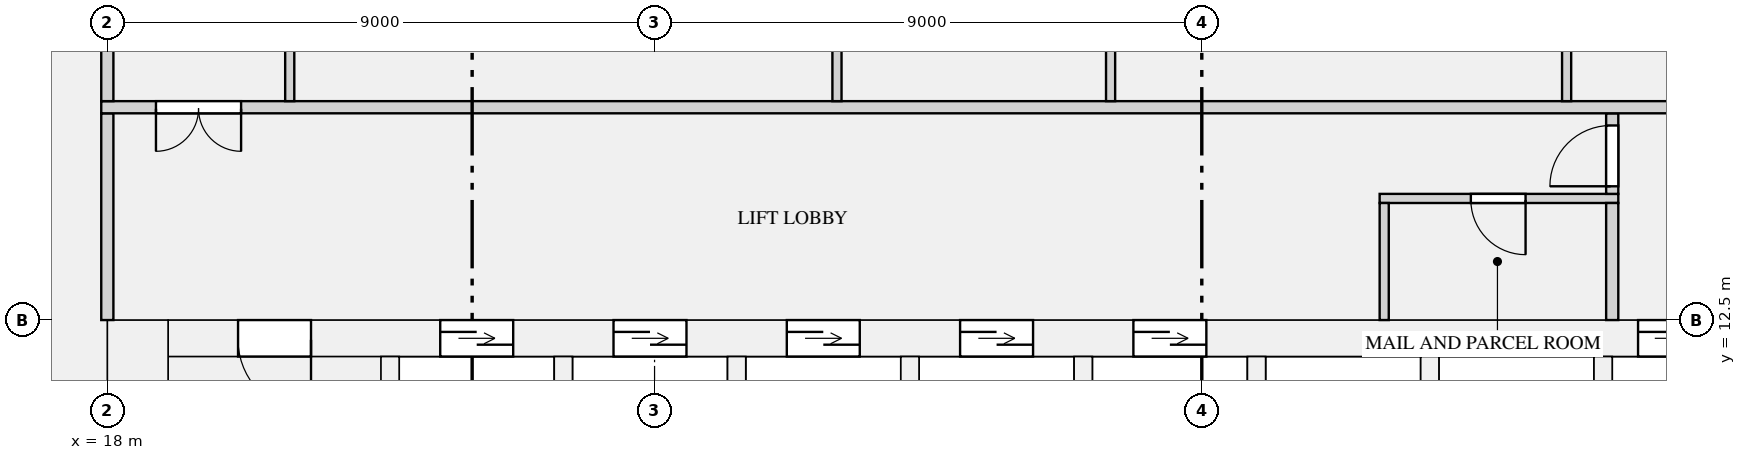
"""IFC4 building model, lengths in metres.
Left out: names, types, materials, properties, quantities, classifications, styles, units other than length and angle.
Written with IfcOpenShell. Run it as: python <this file> out.ifc"""

import sys

from ifc_helpers import new_model, si_unit, direction, frame, frame_2d, origin, place, context, subcontext, project, spatial, rectangle, extrude, element, fill, save


model = new_model("IFC4")
c1 = context("Model", 3, precision=1e-05, world=origin(), true_north=direction((0.0, 1.0)))
c2 = subcontext(c1, "Body", "Model", "MODEL_VIEW")
j1 = project(units=[si_unit("LENGTHUNIT", "METRE"), si_unit("PLANEANGLEUNIT", "RADIAN")], contexts=[c1])
p1 = place(None, origin())
s1 = spatial("IfcSite", under=j1, at=p1, CompositionType="ELEMENT")
p2 = place(p1, origin())
s2 = spatial("IfcBuilding", under=s1, at=p2, CompositionType="ELEMENT")
p3 = place(p2, frame((0.0, 0.0, 69.9)))
s3 = spatial("IfcBuildingStorey", under=s2, at=p3, CompositionType="ELEMENT", Elevation=69.9)
p4 = place(p3, frame((18.5, 0.0, 0.0), z_axis=(0.0, 0.0, 1.0), x_axis=(0.0, 1.0, 0.0)))
e1 = element("IfcWall", 1, at=p4, inside=s3, PredefinedType="SHEAR", context=c2, shape_type="SweptSolid", body=[
    extrude(rectangle(XDim=12.5, YDim=1.0, at=frame_2d((6.25, 0.0))), origin(), (0.0, 0.0, 1.0), 3.15),
])
p5 = place(p3, frame((19.0, 12.2, 0.0), z_axis=(0.0, 0.0, 1.0), x_axis=(1.0, 0.0, 0.0)))
e2 = element("IfcWall", 2, at=p5, inside=s3, PredefinedType="SHEAR", context=c2, shape_type="SweptSolid", body=[
    extrude(rectangle(XDim=34.0, YDim=0.6, at=frame_2d((17.0, 0.0))), origin(), (0.0, 0.0, 1.0), 3.15),
])
p6 = place(p5, frame((4.475, 0.0, 0.0)))
e3 = element("IfcOpeningElement", 3, at=p6, cuts=e2, PredefinedType="OPENING", context=c2, shape_type="SweptSolid", body=[
    extrude(rectangle(XDim=1.2, YDim=2.1, at=frame_2d((0.6, 1.05))), frame((0.0, 0.31, 0.0), z_axis=(0.0, -1.0, 0.0), x_axis=(1.0, 0.0, 0.0)), (0.0, 0.0, 1.0), 0.62),
])
p7 = place(p5, frame((7.325, 0.0, 0.0)))
e4 = element("IfcOpeningElement", 4, at=p7, cuts=e2, PredefinedType="OPENING", context=c2, shape_type="SweptSolid", body=[
    extrude(rectangle(XDim=1.2, YDim=2.1, at=frame_2d((0.6, 1.05))), frame((0.0, 0.31, 0.0), z_axis=(0.0, -1.0, 0.0), x_axis=(1.0, 0.0, 0.0)), (0.0, 0.0, 1.0), 0.62),
])
p8 = place(p5, frame((10.175, 0.0, 0.0)))
e5 = element("IfcOpeningElement", 5, at=p8, cuts=e2, PredefinedType="OPENING", context=c2, shape_type="SweptSolid", body=[
    extrude(rectangle(XDim=1.2, YDim=2.1, at=frame_2d((0.6, 1.05))), frame((0.0, 0.31, 0.0), z_axis=(0.0, -1.0, 0.0), x_axis=(1.0, 0.0, 0.0)), (0.0, 0.0, 1.0), 0.62),
])
p9 = place(p5, frame((13.025, 0.0, 0.0)))
e6 = element("IfcOpeningElement", 6, at=p9, cuts=e2, PredefinedType="OPENING", context=c2, shape_type="SweptSolid", body=[
    extrude(rectangle(XDim=1.2, YDim=2.1, at=frame_2d((0.6, 1.05))), frame((0.0, 0.31, 0.0), z_axis=(0.0, -1.0, 0.0), x_axis=(1.0, 0.0, 0.0)), (0.0, 0.0, 1.0), 0.62),
])
p10 = place(p5, frame((15.875, 0.0, 0.0)))
e7 = element("IfcOpeningElement", 7, at=p10, cuts=e2, PredefinedType="OPENING", context=c2, shape_type="SweptSolid", body=[
    extrude(rectangle(XDim=1.2, YDim=2.1, at=frame_2d((0.6, 1.05))), frame((0.0, 0.31, 0.0), z_axis=(0.0, -1.0, 0.0), x_axis=(1.0, 0.0, 0.0)), (0.0, 0.0, 1.0), 0.62),
])
p11 = place(p5, frame((24.175, 0.0, 0.0)))
e8 = element("IfcOpeningElement", 8, at=p11, cuts=e2, PredefinedType="OPENING", context=c2, shape_type="SweptSolid", body=[
    extrude(rectangle(XDim=1.1, YDim=2.1, at=frame_2d((0.55, 1.05))), frame((0.0, 0.31, 0.0), z_axis=(0.0, -1.0, 0.0), x_axis=(1.0, 0.0, 0.0)), (0.0, 0.0, 1.0), 0.62),
])
p12 = place(p5, frame((26.425, 0.0, 0.0)))
e9 = element("IfcOpeningElement", 9, at=p12, cuts=e2, PredefinedType="OPENING", context=c2, shape_type="SweptSolid", body=[
    extrude(rectangle(XDim=1.1, YDim=2.1, at=frame_2d((0.55, 1.05))), frame((0.0, 0.31, 0.0), z_axis=(0.0, -1.0, 0.0), x_axis=(1.0, 0.0, 0.0)), (0.0, 0.0, 1.0), 0.62),
])
p13 = place(p5, frame((28.675, 0.0, 0.0)))
e10 = element("IfcOpeningElement", 10, at=p13, cuts=e2, PredefinedType="OPENING", context=c2, shape_type="SweptSolid", body=[
    extrude(rectangle(XDim=1.1, YDim=2.1, at=frame_2d((0.55, 1.05))), frame((0.0, 0.31, 0.0), z_axis=(0.0, -1.0, 0.0), x_axis=(1.0, 0.0, 0.0)), (0.0, 0.0, 1.0), 0.62),
])
p14 = place(p5, frame((1.15, 0.0, 0.0)))
e11 = element("IfcOpeningElement", 11, at=p14, cuts=e2, PredefinedType="OPENING", context=c2, shape_type="SweptSolid", body=[
    extrude(rectangle(XDim=1.2, YDim=2.1, at=frame_2d((0.6, 1.05))), frame((0.0, 0.31, 0.0), z_axis=(0.0, -1.0, 0.0), x_axis=(1.0, 0.0, 0.0)), (0.0, 0.0, 1.0), 0.62),
])
p15 = place(p5, frame((31.65, 0.0, 0.0)))
e12 = element("IfcOpeningElement", 12, at=p15, cuts=e2, PredefinedType="OPENING", context=c2, shape_type="SweptSolid", body=[
    extrude(rectangle(XDim=1.2, YDim=2.1, at=frame_2d((0.6, 1.05))), frame((0.0, 0.31, 0.0), z_axis=(0.0, -1.0, 0.0), x_axis=(1.0, 0.0, 0.0)), (0.0, 0.0, 1.0), 0.62),
])
for number, where, z_axis, x_axis in (
    (13, (22.65, 9.35, 0.0), (0.0, 0.0, 1.0), (0.0, 1.0, 0.0)),
    (14, (25.5, 9.35, 0.0), (0.0, 0.0, 1.0), (0.0, 1.0, 0.0)),
    (15, (28.35, 9.35, 0.0), (0.0, 0.0, 1.0), (0.0, 1.0, 0.0)),
    (16, (31.2, 9.35, 0.0), (0.0, 0.0, 1.0), (0.0, 1.0, 0.0)),
    (17, (34.05, 9.35, 0.0), (0.0, 0.0, 1.0), (0.0, 1.0, 0.0)),
    (18, (36.9, 9.35, 0.0), (0.0, 0.0, 1.0), (0.0, 1.0, 0.0)),
    (19, (39.75, 9.35, 0.0), (0.0, 0.0, 1.0), (0.0, 1.0, 0.0)),
):
    element("IfcWall", number, at=place(p3, frame(where, z_axis=z_axis, x_axis=x_axis)), inside=s3, PredefinedType="SHEAR", context=c2, shape_type="SweptSolid", body=[
        extrude(rectangle(XDim=2.55, YDim=0.3, at=frame_2d((1.275, 0.0))), origin(), (0.0, 0.0, 1.0), 3.15),
    ])
p16 = place(p3, frame((42.6, 8.25, 0.0), z_axis=(0.0, 0.0, 1.0), x_axis=(0.0, 1.0, 0.0)))
e20 = element("IfcWall", 20, at=p16, inside=s3, PredefinedType="SHEAR", context=c2, shape_type="SweptSolid", body=[
    extrude(rectangle(XDim=3.65, YDim=0.3, at=frame_2d((1.825, 0.0))), origin(), (0.0, 0.0, 1.0), 3.15),
])
p17 = place(p3, frame((38.925, 14.5, 0.0), z_axis=(0.0, 0.0, 1.0), x_axis=(1.0, 0.0, 0.0)))
e21 = element("IfcWall", 21, at=p17, inside=s3, PredefinedType="PARTITIONING", context=c2, shape_type="SweptSolid", body=[
    extrude(rectangle(XDim=3.925, YDim=0.15, at=frame_2d((1.962, 0.0))), origin(), (0.0, 0.0, 1.0), 2.65),
])
p18 = place(p17, frame((1.5, 0.0, 0.0)))
e22 = element("IfcOpeningElement", 22, at=p18, cuts=e21, PredefinedType="OPENING", context=c2, shape_type="SweptSolid", body=[
    extrude(rectangle(XDim=0.9, YDim=2.1, at=frame_2d((0.45, 1.05))), frame((0.0, 0.085, 0.0), z_axis=(0.0, -1.0, 0.0), x_axis=(1.0, 0.0, 0.0)), (0.0, 0.0, 1.0), 0.17),
])
p19 = place(p3, frame((18.0, 12.5, 0.0), z_axis=(0.0, 0.0, 1.0), x_axis=(0.0, 1.0, 0.0)))
e23 = element("IfcWall", 23, at=p19, inside=s3, PredefinedType="PARTITIONING", context=c2, shape_type="SweptSolid", body=[
    extrude(rectangle(XDim=3.4, YDim=0.2, at=frame_2d((1.7, 0.0))), origin(), (0.0, 0.0, 1.0), 2.65),
])
p20 = place(p3, frame((39.0, 12.5, 0.0), z_axis=(0.0, 0.0, 1.0), x_axis=(0.0, 1.0, 0.0)))
e24 = element("IfcWall", 24, at=p20, inside=s3, PredefinedType="PARTITIONING", context=c2, shape_type="SweptSolid", body=[
    extrude(rectangle(XDim=1.925, YDim=0.15, at=frame_2d((0.962, 0.0))), origin(), (0.0, 0.0, 1.0), 2.65),
])
p21 = place(p3, frame((42.75, 12.5, 0.0), z_axis=(0.0, 0.0, 1.0), x_axis=(0.0, 1.0, 0.0)))
e25 = element("IfcWall", 25, at=p21, inside=s3, PredefinedType="PARTITIONING", context=c2, shape_type="SweptSolid", body=[
    extrude(rectangle(XDim=1.925, YDim=0.2, at=frame_2d((0.962, 0.0))), origin(), (0.0, 0.0, 1.0), 2.65),
])
p22 = place(p3, frame((42.75, 14.575, 0.0), z_axis=(0.0, 0.0, 1.0), x_axis=(0.0, 1.0, 0.0)))
e26 = element("IfcWall", 26, at=p22, inside=s3, PredefinedType="PARTITIONING", context=c2, shape_type="SweptSolid", body=[
    extrude(rectangle(XDim=1.325, YDim=0.2, at=frame_2d((0.663, 0.0))), origin(), (0.0, 0.0, 1.0), 2.65),
])
p23 = place(p22, frame((0.125, 0.0, 0.0)))
e27 = element("IfcOpeningElement", 27, at=p23, cuts=e26, PredefinedType="OPENING", context=c2, shape_type="SweptSolid", body=[
    extrude(rectangle(XDim=1.0, YDim=2.1, at=frame_2d((0.5, 1.05))), frame((0.0, 0.11, 0.0), z_axis=(0.0, -1.0, 0.0), x_axis=(1.0, 0.0, 0.0)), (0.0, 0.0, 1.0), 0.22),
])
p24 = place(p3, frame((17.9, 16.0, 0.0), z_axis=(0.0, 0.0, 1.0), x_axis=(1.0, 0.0, 0.0)))
e28 = element("IfcWall", 28, at=p24, inside=s3, PredefinedType="PARTITIONING", context=c2, shape_type="SweptSolid", body=[
    extrude(rectangle(XDim=36.2, YDim=0.2, at=frame_2d((18.1, 0.0))), origin(), (0.0, 0.0, 1.0), 2.65),
])
p25 = place(p24, frame((0.9, 0.0, 0.0)))
e29 = element("IfcOpeningElement", 29, at=p25, cuts=e28, PredefinedType="OPENING", context=c2, shape_type="SweptSolid", body=[
    extrude(rectangle(XDim=1.4, YDim=2.1, at=frame_2d((0.7, 1.05))), frame((0.0, 0.11, 0.0), z_axis=(0.0, -1.0, 0.0), x_axis=(1.0, 0.0, 0.0)), (0.0, 0.0, 1.0), 0.22),
])
p26 = place(p24, frame((33.9, 0.0, 0.0)))
e30 = element("IfcOpeningElement", 30, at=p26, cuts=e28, PredefinedType="OPENING", context=c2, shape_type="SweptSolid", body=[
    extrude(rectangle(XDim=1.4, YDim=2.1, at=frame_2d((0.7, 1.05))), frame((0.0, 0.11, 0.0), z_axis=(0.0, -1.0, 0.0), x_axis=(1.0, 0.0, 0.0)), (0.0, 0.0, 1.0), 0.22),
])
p27 = place(p3, frame((18.0, 16.1, 0.0), z_axis=(0.0, 0.0, 1.0), x_axis=(0.0, 1.0, 0.0)))
e31 = element("IfcWall", 31, at=p27, inside=s3, PredefinedType="PARTITIONING", context=c2, shape_type="SweptSolid", body=[
    extrude(rectangle(XDim=7.8, YDim=0.2, at=frame_2d((3.9, 0.0))), origin(), (0.0, 0.0, 1.0), 2.65),
])
p28 = place(p27, frame((2.35, 0.0, 0.0)))
e32 = element("IfcOpeningElement", 32, at=p28, cuts=e31, PredefinedType="OPENING", context=c2, shape_type="SweptSolid", body=[
    extrude(rectangle(XDim=1.1, YDim=2.1, at=frame_2d((0.55, 1.05))), frame((0.0, 0.11, 0.0), z_axis=(0.0, -1.0, 0.0), x_axis=(1.0, 0.0, 0.0)), (0.0, 0.0, 1.0), 0.22),
])
for number, where, z_axis, x_axis in (
    (33, (21.0, 16.1, 0.0), (0.0, 0.0, 1.0), (0.0, 1.0, 0.0)),
    (34, (30.0, 16.1, 0.0), (0.0, 0.0, 1.0), (0.0, 1.0, 0.0)),
    (35, (34.5, 16.1, 0.0), (0.0, 0.0, 1.0), (0.0, 1.0, 0.0)),
    (36, (42.0, 16.1, 0.0), (0.0, 0.0, 1.0), (0.0, 1.0, 0.0)),
):
    element("IfcWall", number, at=place(p3, frame(where, z_axis=z_axis, x_axis=x_axis)), inside=s3, PredefinedType="PARTITIONING", context=c2, shape_type="SweptSolid", body=[
        extrude(rectangle(XDim=4.825, YDim=0.15, at=frame_2d((2.413, 0.0))), origin(), (0.0, 0.0, 1.0), 2.65),
    ])
p29 = place(p6, origin())
e37 = element("IfcDoor", 37, at=p29, inside=s3, OperationType="DOUBLE_DOOR_SLIDING", PredefinedType="DOOR", context=c2, shape_type="SweptSolid", body=[
    extrude(rectangle(XDim=1.2, YDim=2.1, at=frame_2d((0.6, 1.05))), frame((0.0, 0.025, 0.0), z_axis=(0.0, -1.0, 0.0), x_axis=(1.0, 0.0, 0.0)), (0.0, 0.0, 1.0), 0.05),
])
fill(e3, e37)
p30 = place(p7, origin())
e38 = element("IfcDoor", 38, at=p30, inside=s3, OperationType="DOUBLE_DOOR_SLIDING", PredefinedType="DOOR", context=c2, shape_type="SweptSolid", body=[
    extrude(rectangle(XDim=1.2, YDim=2.1, at=frame_2d((0.6, 1.05))), frame((0.0, 0.025, 0.0), z_axis=(0.0, -1.0, 0.0), x_axis=(1.0, 0.0, 0.0)), (0.0, 0.0, 1.0), 0.05),
])
fill(e4, e38)
p31 = place(p8, origin())
e39 = element("IfcDoor", 39, at=p31, inside=s3, OperationType="DOUBLE_DOOR_SLIDING", PredefinedType="DOOR", context=c2, shape_type="SweptSolid", body=[
    extrude(rectangle(XDim=1.2, YDim=2.1, at=frame_2d((0.6, 1.05))), frame((0.0, 0.025, 0.0), z_axis=(0.0, -1.0, 0.0), x_axis=(1.0, 0.0, 0.0)), (0.0, 0.0, 1.0), 0.05),
])
fill(e5, e39)
p32 = place(p9, origin())
e40 = element("IfcDoor", 40, at=p32, inside=s3, OperationType="DOUBLE_DOOR_SLIDING", PredefinedType="DOOR", context=c2, shape_type="SweptSolid", body=[
    extrude(rectangle(XDim=1.2, YDim=2.1, at=frame_2d((0.6, 1.05))), frame((0.0, 0.025, 0.0), z_axis=(0.0, -1.0, 0.0), x_axis=(1.0, 0.0, 0.0)), (0.0, 0.0, 1.0), 0.05),
])
fill(e6, e40)
p33 = place(p10, origin())
e41 = element("IfcDoor", 41, at=p33, inside=s3, OperationType="DOUBLE_DOOR_SLIDING", PredefinedType="DOOR", context=c2, shape_type="SweptSolid", body=[
    extrude(rectangle(XDim=1.2, YDim=2.1, at=frame_2d((0.6, 1.05))), frame((0.0, 0.025, 0.0), z_axis=(0.0, -1.0, 0.0), x_axis=(1.0, 0.0, 0.0)), (0.0, 0.0, 1.0), 0.05),
])
fill(e7, e41)
p34 = place(p11, origin())
e42 = element("IfcDoor", 42, at=p34, inside=s3, OperationType="DOUBLE_DOOR_SLIDING", PredefinedType="DOOR", context=c2, shape_type="SweptSolid", body=[
    extrude(rectangle(XDim=1.1, YDim=2.1, at=frame_2d((0.55, 1.05))), frame((0.0, 0.025, 0.0), z_axis=(0.0, -1.0, 0.0), x_axis=(1.0, 0.0, 0.0)), (0.0, 0.0, 1.0), 0.05),
])
fill(e8, e42)
p35 = place(p18, frame((0.9, 0.0, 0.0), z_axis=(0.0, 0.0, 1.0), x_axis=(-1.0, 0.0, 0.0)))
e43 = element("IfcDoor", 43, at=p35, inside=s3, OperationType="SINGLE_SWING_LEFT", PredefinedType="DOOR", context=c2, shape_type="SweptSolid", body=[
    extrude(rectangle(XDim=0.9, YDim=2.1, at=frame_2d((0.45, 1.05))), frame((0.0, 0.025, 0.0), z_axis=(0.0, -1.0, 0.0), x_axis=(1.0, 0.0, 0.0)), (0.0, 0.0, 1.0), 0.05),
])
fill(e22, e43)
p36 = place(p14, frame((1.2, 0.0, 0.0), z_axis=(0.0, 0.0, 1.0), x_axis=(-1.0, 0.0, 0.0)))
e44 = element("IfcDoor", 44, at=p36, inside=s3, OperationType="SINGLE_SWING_LEFT", PredefinedType="DOOR", context=c2, shape_type="SweptSolid", body=[
    extrude(rectangle(XDim=1.2, YDim=2.1, at=frame_2d((0.6, 1.05))), frame((0.0, 0.025, 0.0), z_axis=(0.0, -1.0, 0.0), x_axis=(1.0, 0.0, 0.0)), (0.0, 0.0, 1.0), 0.05),
])
fill(e11, e44)
p37 = place(p23, origin())
e45 = element("IfcDoor", 45, at=p37, inside=s3, OperationType="SINGLE_SWING_LEFT", PredefinedType="DOOR", context=c2, shape_type="SweptSolid", body=[
    extrude(rectangle(XDim=1.0, YDim=2.1, at=frame_2d((0.5, 1.05))), frame((0.0, 0.025, 0.0), z_axis=(0.0, -1.0, 0.0), x_axis=(1.0, 0.0, 0.0)), (0.0, 0.0, 1.0), 0.05),
])
fill(e27, e45)
p38 = place(p25, frame((1.4, 0.0, 0.0), z_axis=(0.0, 0.0, 1.0), x_axis=(-1.0, 0.0, 0.0)))
e46 = element("IfcDoor", 46, at=p38, inside=s3, OperationType="DOUBLE_DOOR_SINGLE_SWING", PredefinedType="DOOR", context=c2, shape_type="SweptSolid", body=[
    extrude(rectangle(XDim=1.4, YDim=2.1, at=frame_2d((0.7, 1.05))), frame((0.0, 0.025, 0.0), z_axis=(0.0, -1.0, 0.0), x_axis=(1.0, 0.0, 0.0)), (0.0, 0.0, 1.0), 0.05),
])
fill(e29, e46)
save(model, sys.argv[1])
